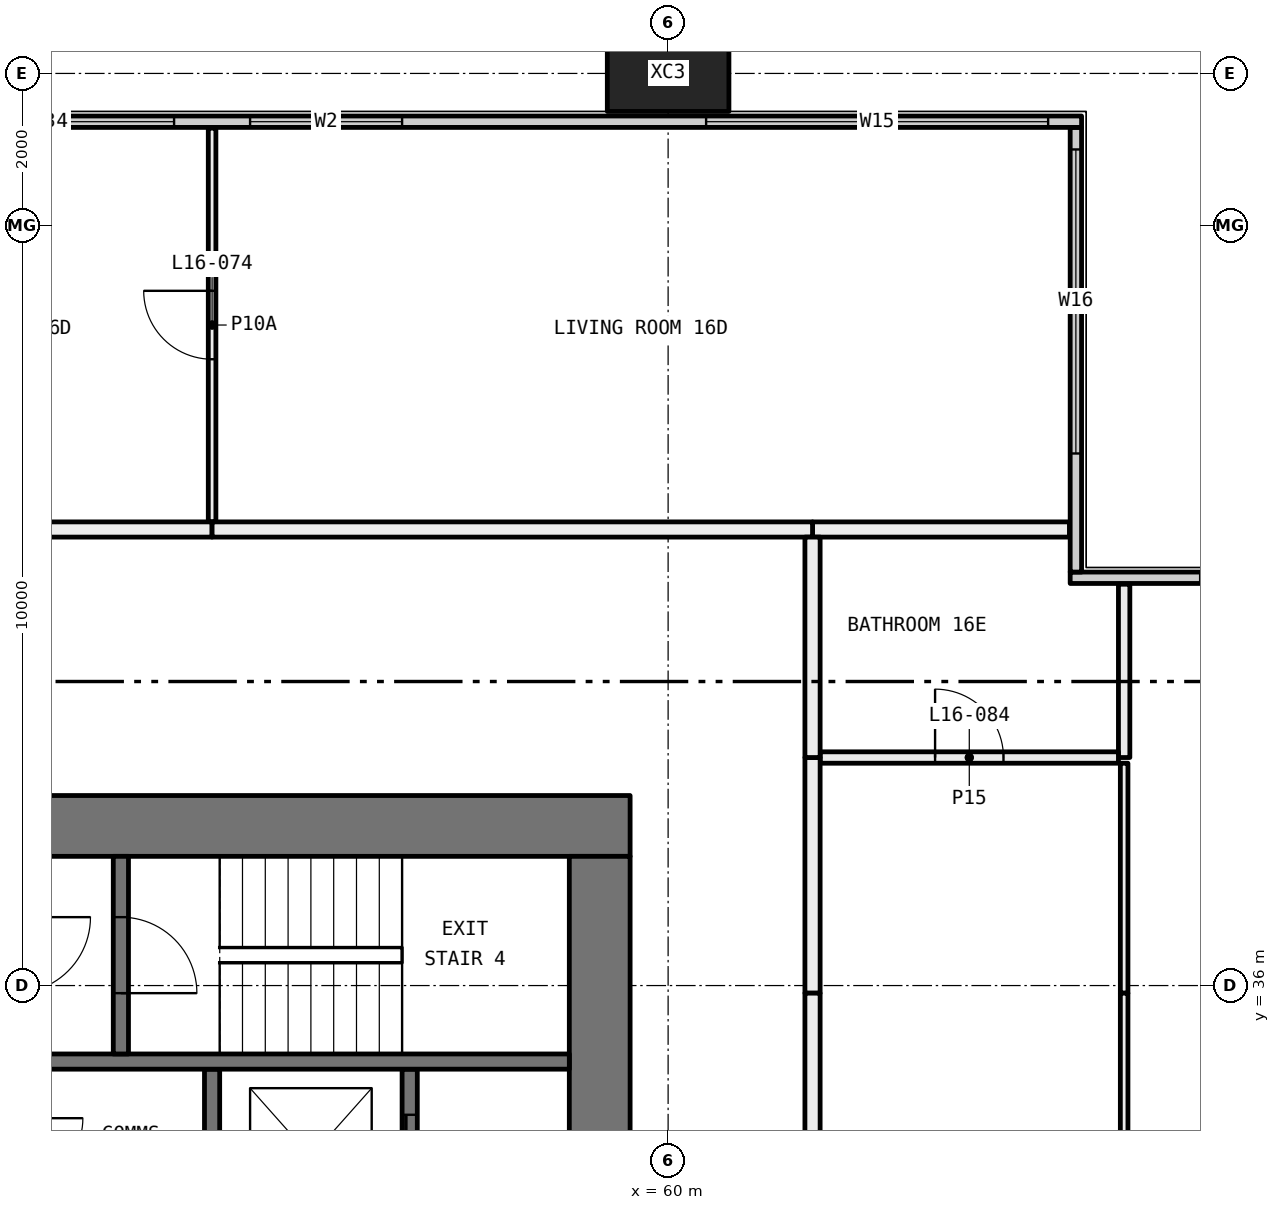
"""IFC4 building model, lengths in metres.
Left out: names, types, materials, properties, quantities, classifications, styles, units other than length and angle.
Written with IfcOpenShell. Run it as: python <this file> out.ifc"""

import sys

from ifc_helpers import new_model, si_unit, direction, frame, frame_2d, origin, origin_2d, place, context, subcontext, project, spatial, rectangle, hollow_rectangle, extrude, element, fill, save


model = new_model("IFC4")
c1 = context("Model", 3, precision=1e-05, world=origin(), true_north=direction((0.0, 1.0)))
c2 = subcontext(c1, "Body", "Model", "MODEL_VIEW")
j1 = project(units=[si_unit("LENGTHUNIT", "METRE"), si_unit("PLANEANGLEUNIT", "RADIAN")], contexts=[c1])
p1 = place(None, origin())
s1 = spatial("IfcSite", under=j1, at=p1, CompositionType="ELEMENT")
p2 = place(p1, origin())
s2 = spatial("IfcBuilding", under=s1, at=p2, CompositionType="ELEMENT")
p3 = place(p2, frame((0.0, 0.0, 67.95)))
s3 = spatial("IfcBuildingStorey", under=s2, at=p3, CompositionType="ELEMENT", Elevation=67.95)
p4 = place(p3, frame((60.0, 48.0, -0.4), z_axis=(0.0, 0.0, 1.0), x_axis=(1.0, 0.0, 0.0)))
e1 = element("IfcColumn", 1, at=p4, inside=s3, PredefinedType="COLUMN", context=c2, shape_type="SweptSolid", body=[
    extrude(hollow_rectangle(XDim=1.6, YDim=1.0, WallThickness=0.065, at=origin_2d()), origin(), (0.0, 0.0, 1.0), 3.45),
])
p5 = place(p3, frame((65.29, 41.365, 0.0), z_axis=(0.0, 0.0, 1.0), x_axis=(1.0, 0.0, 0.0)))
e2 = element("IfcWall", 2, at=p5, inside=s3, PredefinedType="ELEMENTEDWALL", context=c2, shape_type="SweptSolid", body=[
    extrude(rectangle(XDim=6.15, YDim=0.15, at=frame_2d((3.075, 0.0))), origin(), (0.0, 0.0, 1.0), 3.05),
])
p6 = place(p5, frame((1.71, 0.0, 0.45)))
e3 = element("IfcOpeningElement", 3, at=p6, cuts=e2, PredefinedType="OPENING", context=c2, shape_type="SweptSolid", body=[
    extrude(rectangle(XDim=4.0, YDim=2.55, at=frame_2d((2.0, 1.275))), frame((0.0, 0.085, 0.0), z_axis=(0.0, -1.0, 0.0), x_axis=(1.0, 0.0, 0.0)), (0.0, 0.0, 1.0), 0.17),
])
p7 = place(p3, frame((65.365, 41.44, 0.0), z_axis=(0.0, 0.0, 1.0), x_axis=(0.0, 1.0, 0.0)))
e4 = element("IfcWall", 4, at=p7, inside=s3, PredefinedType="ELEMENTEDWALL", context=c2, shape_type="SweptSolid", body=[
    extrude(rectangle(XDim=5.85, YDim=0.15, at=frame_2d((2.925, 0.0))), origin(), (0.0, 0.0, 1.0), 3.05),
])
p8 = place(p7, frame((1.56, 0.0, 0.45)))
e5 = element("IfcOpeningElement", 5, at=p8, cuts=e4, PredefinedType="OPENING", context=c2, shape_type="SweptSolid", body=[
    extrude(rectangle(XDim=4.0, YDim=2.55, at=frame_2d((2.0, 1.275))), frame((0.0, 0.085, 0.0), z_axis=(0.0, -1.0, 0.0), x_axis=(1.0, 0.0, 0.0)), (0.0, 0.0, 1.0), 0.17),
])
p9 = place(p3, frame((6.56, 47.365, 0.0), z_axis=(0.0, 0.0, 1.0), x_axis=(1.0, 0.0, 0.0)))
e6 = element("IfcWall", 6, at=p9, inside=s3, PredefinedType="ELEMENTEDWALL", context=c2, shape_type="SweptSolid", body=[
    extrude(rectangle(XDim=58.88, YDim=0.15, at=frame_2d((29.44, 0.0))), origin(), (0.0, 0.0, 1.0), 3.05),
])
p10 = place(p9, frame((0.44, 0.0, 0.45)))
e7 = element("IfcOpeningElement", 7, at=p10, cuts=e6, PredefinedType="OPENING", context=c2, shape_type="SweptSolid", body=[
    extrude(rectangle(XDim=4.5, YDim=2.55, at=frame_2d((2.25, 1.275))), frame((0.0, 0.085, 0.0), z_axis=(0.0, -1.0, 0.0), x_axis=(1.0, 0.0, 0.0)), (0.0, 0.0, 1.0), 0.17),
])
p11 = place(p9, frame((7.69, 0.0, 0.45)))
e8 = element("IfcOpeningElement", 8, at=p11, cuts=e6, PredefinedType="OPENING", context=c2, shape_type="SweptSolid", body=[
    extrude(rectangle(XDim=3.25, YDim=2.55, at=frame_2d((1.625, 1.275))), frame((0.0, 0.085, 0.0), z_axis=(0.0, -1.0, 0.0), x_axis=(1.0, 0.0, 0.0)), (0.0, 0.0, 1.0), 0.17),
])
p12 = place(p9, frame((11.94, 0.0, 0.45)))
e9 = element("IfcOpeningElement", 9, at=p12, cuts=e6, PredefinedType="OPENING", context=c2, shape_type="SweptSolid", body=[
    extrude(rectangle(XDim=3.25, YDim=2.55, at=frame_2d((1.625, 1.275))), frame((0.0, 0.085, 0.0), z_axis=(0.0, -1.0, 0.0), x_axis=(1.0, 0.0, 0.0)), (0.0, 0.0, 1.0), 0.17),
])
p13 = place(p9, frame((19.69, 0.0, 0.45)))
e10 = element("IfcOpeningElement", 10, at=p13, cuts=e6, PredefinedType="OPENING", context=c2, shape_type="SweptSolid", body=[
    extrude(rectangle(XDim=3.25, YDim=2.55, at=frame_2d((1.625, 1.275))), frame((0.0, 0.085, 0.0), z_axis=(0.0, -1.0, 0.0), x_axis=(1.0, 0.0, 0.0)), (0.0, 0.0, 1.0), 0.17),
])
p14 = place(p9, frame((23.94, 0.0, 0.45)))
e11 = element("IfcOpeningElement", 11, at=p14, cuts=e6, PredefinedType="OPENING", context=c2, shape_type="SweptSolid", body=[
    extrude(rectangle(XDim=2.0, YDim=2.55, at=frame_2d((1.0, 1.275))), frame((0.0, 0.085, 0.0), z_axis=(0.0, -1.0, 0.0), x_axis=(1.0, 0.0, 0.0)), (0.0, 0.0, 1.0), 0.17),
])
p15 = place(p9, frame((31.69, 0.0, 0.45)))
e12 = element("IfcOpeningElement", 12, at=p15, cuts=e6, PredefinedType="OPENING", context=c2, shape_type="SweptSolid", body=[
    extrude(rectangle(XDim=3.25, YDim=2.55, at=frame_2d((1.625, 1.275))), frame((0.0, 0.085, 0.0), z_axis=(0.0, -1.0, 0.0), x_axis=(1.0, 0.0, 0.0)), (0.0, 0.0, 1.0), 0.17),
])
p16 = place(p9, frame((35.94, 0.0, 0.45)))
e13 = element("IfcOpeningElement", 13, at=p16, cuts=e6, PredefinedType="OPENING", context=c2, shape_type="SweptSolid", body=[
    extrude(rectangle(XDim=3.25, YDim=2.55, at=frame_2d((1.625, 1.275))), frame((0.0, 0.085, 0.0), z_axis=(0.0, -1.0, 0.0), x_axis=(1.0, 0.0, 0.0)), (0.0, 0.0, 1.0), 0.17),
])
p17 = place(p9, frame((43.69, 0.0, 0.45)))
e14 = element("IfcOpeningElement", 14, at=p17, cuts=e6, PredefinedType="OPENING", context=c2, shape_type="SweptSolid", body=[
    extrude(rectangle(XDim=3.25, YDim=2.55, at=frame_2d((1.625, 1.275))), frame((0.0, 0.085, 0.0), z_axis=(0.0, -1.0, 0.0), x_axis=(1.0, 0.0, 0.0)), (0.0, 0.0, 1.0), 0.17),
])
p18 = place(p9, frame((47.94, 0.0, 0.45)))
e15 = element("IfcOpeningElement", 15, at=p18, cuts=e6, PredefinedType="OPENING", context=c2, shape_type="SweptSolid", body=[
    extrude(rectangle(XDim=2.0, YDim=2.55, at=frame_2d((1.0, 1.275))), frame((0.0, 0.085, 0.0), z_axis=(0.0, -1.0, 0.0), x_axis=(1.0, 0.0, 0.0)), (0.0, 0.0, 1.0), 0.17),
])
p19 = place(p9, frame((53.94, 0.0, 0.45)))
e16 = element("IfcOpeningElement", 16, at=p19, cuts=e6, PredefinedType="OPENING", context=c2, shape_type="SweptSolid", body=[
    extrude(rectangle(XDim=4.5, YDim=2.55, at=frame_2d((2.25, 1.275))), frame((0.0, 0.085, 0.0), z_axis=(0.0, -1.0, 0.0), x_axis=(1.0, 0.0, 0.0)), (0.0, 0.0, 1.0), 0.17),
])
p20 = place(p3, frame((54.0, 42.1, 0.0), z_axis=(0.0, 0.0, 1.0), x_axis=(0.0, 1.0, 0.0)))
e17 = element("IfcWall", 17, at=p20, inside=s3, PredefinedType="PARTITIONING", context=c2, shape_type="SweptSolid", body=[
    extrude(rectangle(XDim=5.18, YDim=0.1, at=frame_2d((2.59, 0.0))), origin(), (0.0, 0.0, 1.0), 3.05),
])
p21 = place(p20, frame((2.14, 0.0, 0.0)))
e18 = element("IfcOpeningElement", 18, at=p21, cuts=e17, PredefinedType="OPENING", context=c2, shape_type="SweptSolid", body=[
    extrude(rectangle(XDim=0.9, YDim=2.1, at=frame_2d((0.45, 1.05))), frame((0.0, 0.06, 0.0), z_axis=(0.0, -1.0, 0.0), x_axis=(1.0, 0.0, 0.0)), (0.0, 0.0, 1.0), 0.12),
])
p22 = place(p3, frame((48.0, 42.0, 0.0), z_axis=(0.0, 0.0, 1.0), x_axis=(1.0, 0.0, 0.0)))
e19 = element("IfcWall", 19, at=p22, inside=s3, PredefinedType="PARTITIONING", context=c2, shape_type="SweptSolid", body=[
    extrude(rectangle(XDim=6.0, YDim=0.2, at=frame_2d((3.0, 0.0))), origin(), (0.0, 0.0, 1.0), 3.05),
])
p23 = place(p3, frame((61.9, 42.0, 0.0), z_axis=(0.0, 0.0, 1.0), x_axis=(1.0, 0.0, 0.0)))
e20 = element("IfcWall", 20, at=p23, inside=s3, PredefinedType="PARTITIONING", context=c2, shape_type="SweptSolid", body=[
    extrude(rectangle(XDim=3.38, YDim=0.2, at=frame_2d((1.69, 0.0))), origin(), (0.0, 0.0, 1.0), 3.05),
])
p24 = place(p3, frame((54.0, 42.0, 0.0), z_axis=(0.0, 0.0, 1.0), x_axis=(1.0, 0.0, 0.0)))
e21 = element("IfcWall", 21, at=p24, inside=s3, PredefinedType="PARTITIONING", context=c2, shape_type="SweptSolid", body=[
    extrude(rectangle(XDim=7.9, YDim=0.2, at=frame_2d((3.95, 0.0))), origin(), (0.0, 0.0, 1.0), 3.05),
])
p25 = place(p3, frame((66.0, 38.925, 0.0), z_axis=(0.0, 0.0, 1.0), x_axis=(0.0, -1.0, 0.0)))
e22 = element("IfcWall", 22, at=p25, inside=s3, PredefinedType="PARTITIONING", context=c2, shape_type="SweptSolid", body=[
    extrude(rectangle(XDim=3.025, YDim=0.1, at=frame_2d((1.513, 0.0))), origin(), (0.0, 0.0, 1.0), 2.45),
])
p26 = place(p3, frame((66.0, 35.9, 0.0), z_axis=(0.0, 0.0, 1.0), x_axis=(0.0, -1.0, 0.0)))
e23 = element("IfcWall", 23, at=p26, inside=s3, PredefinedType="PARTITIONING", context=c2, shape_type="SweptSolid", body=[
    extrude(rectangle(XDim=5.85, YDim=0.1, at=frame_2d((2.925, 0.0))), origin(), (0.0, 0.0, 1.0), 3.05),
])
p27 = place(p26, frame((2.475, 0.0, 0.0)))
e24 = element("IfcOpeningElement", 24, at=p27, cuts=e23, PredefinedType="OPENING", context=c2, shape_type="SweptSolid", body=[
    extrude(rectangle(XDim=0.9, YDim=2.1, at=frame_2d((0.45, 1.05))), frame((0.0, 0.06, 0.0), z_axis=(0.0, -1.0, 0.0), x_axis=(1.0, 0.0, 0.0)), (0.0, 0.0, 1.0), 0.12),
])
p28 = place(p3, frame((66.0, 41.28, 0.0), z_axis=(0.0, 0.0, 1.0), x_axis=(0.0, -1.0, 0.0)))
e25 = element("IfcWall", 25, at=p28, inside=s3, PredefinedType="PARTITIONING", context=c2, shape_type="SweptSolid", body=[
    extrude(rectangle(XDim=2.28, YDim=0.15, at=frame_2d((1.14, 0.0))), origin(), (0.0, 0.0, 1.0), 3.05),
])
p29 = place(p3, frame((65.925, 39.0, 0.0), z_axis=(0.0, 0.0, 1.0), x_axis=(-1.0, 0.0, 0.0)))
e26 = element("IfcWall", 26, at=p29, inside=s3, PredefinedType="PARTITIONING", context=c2, shape_type="SweptSolid", body=[
    extrude(rectangle(XDim=3.925, YDim=0.15, at=frame_2d((1.962, 0.0))), origin(), (0.0, 0.0, 1.0), 3.05),
])
p30 = place(p29, frame((1.512, 0.0, 0.0)))
e27 = element("IfcOpeningElement", 27, at=p30, cuts=e26, PredefinedType="OPENING", context=c2, shape_type="SweptSolid", body=[
    extrude(rectangle(XDim=0.9, YDim=2.1, at=frame_2d((0.45, 1.05))), frame((0.0, 0.085, 0.0), z_axis=(0.0, -1.0, 0.0), x_axis=(1.0, 0.0, 0.0)), (0.0, 0.0, 1.0), 0.17),
])
p31 = place(p3, frame((61.9, 39.0, 0.0), z_axis=(0.0, 0.0, 1.0), x_axis=(0.0, -1.0, 0.0)))
e28 = element("IfcWall", 28, at=p31, inside=s3, PredefinedType="PARTITIONING", context=c2, shape_type="SweptSolid", body=[
    extrude(rectangle(XDim=3.1, YDim=0.2, at=frame_2d((1.55, 0.0))), origin(), (0.0, 0.0, 1.0), 2.45),
])
p32 = place(p3, frame((61.9, 35.9, 0.0), z_axis=(0.0, 0.0, 1.0), x_axis=(0.0, -1.0, 0.0)))
e29 = element("IfcWall", 29, at=p32, inside=s3, PredefinedType="PARTITIONING", context=c2, shape_type="SweptSolid", body=[
    extrude(rectangle(XDim=10.4, YDim=0.2, at=frame_2d((5.2, 0.0))), origin(), (0.0, 0.0, 1.0), 3.05),
])
p33 = place(p3, frame((61.9, 41.9, 0.0), z_axis=(0.0, 0.0, 1.0), x_axis=(0.0, -1.0, 0.0)))
e30 = element("IfcWall", 30, at=p33, inside=s3, PredefinedType="PARTITIONING", context=c2, shape_type="SweptSolid", body=[
    extrude(rectangle(XDim=2.9, YDim=0.2, at=frame_2d((1.45, 0.0))), origin(), (0.0, 0.0, 1.0), 3.05),
])
p34 = place(p3, frame((59.5, 38.1, 0.0), z_axis=(0.0, 0.0, 1.0), x_axis=(-1.0, 0.0, 0.0)))
e31 = element("IfcWall", 31, at=p34, inside=s3, PredefinedType="SHEAR", context=c2, shape_type="SweptSolid", body=[
    extrude(rectangle(XDim=11.0, YDim=0.8, at=frame_2d((5.5, 0.0))), origin(), (0.0, 0.0, 1.0), 3.05),
])
p35 = place(p34, frame((8.4, 0.0, 0.0)))
e32 = element("IfcOpeningElement", 32, at=p35, cuts=e31, PredefinedType="OPENING", context=c2, shape_type="SweptSolid", body=[
    extrude(rectangle(XDim=1.6, YDim=2.1, at=frame_2d((0.8, 1.05))), frame((0.0, 0.41, 0.0), z_axis=(0.0, -1.0, 0.0), x_axis=(1.0, 0.0, 0.0)), (0.0, 0.0, 1.0), 0.82),
])
p36 = place(p3, frame((59.1, 22.3, 0.0), z_axis=(0.0, 0.0, 1.0), x_axis=(0.0, 1.0, 0.0)))
e33 = element("IfcWall", 33, at=p36, inside=s3, PredefinedType="SHEAR", context=c2, shape_type="SweptSolid", body=[
    extrude(rectangle(XDim=15.4, YDim=0.8, at=frame_2d((7.7, 0.0))), origin(), (0.0, 0.0, 1.0), 3.05),
])
p37 = place(p36, frame((8.15, 0.0, 0.0)))
e34 = element("IfcOpeningElement", 34, at=p37, cuts=e33, PredefinedType="OPENING", context=c2, shape_type="SweptSolid", body=[
    extrude(rectangle(XDim=1.6, YDim=2.1, at=frame_2d((0.8, 1.05))), frame((0.0, 0.41, 0.0), z_axis=(0.0, -1.0, 0.0), x_axis=(1.0, 0.0, 0.0)), (0.0, 0.0, 1.0), 0.82),
])
p38 = place(p36, frame((2.05, 0.0, 0.0)))
e35 = element("IfcOpeningElement", 35, at=p38, cuts=e33, PredefinedType="OPENING", context=c2, shape_type="SweptSolid", body=[
    extrude(rectangle(XDim=1.0, YDim=2.1, at=frame_2d((0.5, 1.05))), frame((0.0, 0.41, 0.0), z_axis=(0.0, -1.0, 0.0), x_axis=(1.0, 0.0, 0.0)), (0.0, 0.0, 1.0), 0.82),
])
p39 = place(p3, frame((56.6, 22.3, 0.0), z_axis=(0.0, 0.0, 1.0), x_axis=(0.0, 1.0, 0.0)))
e36 = element("IfcWall", 36, at=p39, inside=s3, PredefinedType="SOLIDWALL", context=c2, shape_type="SweptSolid", body=[
    extrude(rectangle(XDim=12.6, YDim=0.2, at=frame_2d((6.3, 0.0))), origin(), (0.0, 0.0, 1.0), 3.05),
])
p40 = place(p39, frame((3.4, 0.0, 0.0)))
e37 = element("IfcOpeningElement", 37, at=p40, cuts=e36, PredefinedType="OPENING", context=c2, shape_type="SweptSolid", body=[
    extrude(rectangle(XDim=1.1, YDim=2.1, at=frame_2d((0.55, 1.05))), frame((0.0, 0.11, 0.0), z_axis=(0.0, -1.0, 0.0), x_axis=(1.0, 0.0, 0.0)), (0.0, 0.0, 1.0), 0.22),
])
p41 = place(p39, frame((5.9, 0.0, 0.0)))
e38 = element("IfcOpeningElement", 38, at=p41, cuts=e36, PredefinedType="OPENING", context=c2, shape_type="SweptSolid", body=[
    extrude(rectangle(XDim=1.1, YDim=2.1, at=frame_2d((0.55, 1.05))), frame((0.0, 0.11, 0.0), z_axis=(0.0, -1.0, 0.0), x_axis=(1.0, 0.0, 0.0)), (0.0, 0.0, 1.0), 0.22),
])
p42 = place(p39, frame((8.4, 0.0, 0.0)))
e39 = element("IfcOpeningElement", 39, at=p42, cuts=e36, PredefinedType="OPENING", context=c2, shape_type="SweptSolid", body=[
    extrude(rectangle(XDim=1.1, YDim=2.1, at=frame_2d((0.55, 1.05))), frame((0.0, 0.11, 0.0), z_axis=(0.0, -1.0, 0.0), x_axis=(1.0, 0.0, 0.0)), (0.0, 0.0, 1.0), 0.22),
])
p43 = place(p39, frame((10.9, 0.0, 0.0)))
e40 = element("IfcOpeningElement", 40, at=p43, cuts=e36, PredefinedType="OPENING", context=c2, shape_type="SweptSolid", body=[
    extrude(rectangle(XDim=1.1, YDim=2.1, at=frame_2d((0.55, 1.05))), frame((0.0, 0.11, 0.0), z_axis=(0.0, -1.0, 0.0), x_axis=(1.0, 0.0, 0.0)), (0.0, 0.0, 1.0), 0.22),
])
p44 = place(p39, frame((0.15, 0.0, 0.0)))
e41 = element("IfcOpeningElement", 41, at=p44, cuts=e36, PredefinedType="OPENING", context=c2, shape_type="SweptSolid", body=[
    extrude(rectangle(XDim=1.0, YDim=2.1, at=frame_2d((0.5, 1.05))), frame((0.0, 0.11, 0.0), z_axis=(0.0, -1.0, 0.0), x_axis=(1.0, 0.0, 0.0)), (0.0, 0.0, 1.0), 0.22),
])
p45 = place(p3, frame((54.0, 25.1, 0.0), z_axis=(0.0, 0.0, 1.0), x_axis=(0.0, 1.0, 0.0)))
e42 = element("IfcWall", 42, at=p45, inside=s3, PredefinedType="SOLIDWALL", context=c2, shape_type="SweptSolid", body=[
    extrude(rectangle(XDim=9.8, YDim=0.2, at=frame_2d((4.9, 0.0))), origin(), (0.0, 0.0, 1.0), 3.05),
])
p46 = place(p3, frame((58.7, 35.0, 0.0), z_axis=(0.0, 0.0, 1.0), x_axis=(-1.0, 0.0, 0.0)))
e43 = element("IfcWall", 43, at=p46, inside=s3, PredefinedType="SOLIDWALL", context=c2, shape_type="SweptSolid", body=[
    extrude(rectangle(XDim=7.2, YDim=0.2, at=frame_2d((3.6, 0.0))), origin(), (0.0, 0.0, 1.0), 3.05),
])
p47 = place(p3, frame((52.8, 35.1, 0.0), z_axis=(0.0, 0.0, 1.0), x_axis=(0.0, 1.0, 0.0)))
e44 = element("IfcWall", 44, at=p47, inside=s3, PredefinedType="SOLIDWALL", context=c2, shape_type="SweptSolid", body=[
    extrude(rectangle(XDim=2.6, YDim=0.2, at=frame_2d((1.3, 0.0))), origin(), (0.0, 0.0, 1.0), 3.05),
])
p48 = place(p47, frame((0.8, 0.0, 0.0)))
e45 = element("IfcOpeningElement", 45, at=p48, cuts=e44, PredefinedType="OPENING", context=c2, shape_type="SweptSolid", body=[
    extrude(rectangle(XDim=1.0, YDim=2.1, at=frame_2d((0.5, 1.05))), frame((0.0, 0.11, 0.0), z_axis=(0.0, -1.0, 0.0), x_axis=(1.0, 0.0, 0.0)), (0.0, 0.0, 1.0), 0.22),
])
p49 = place(p8, origin())
e46 = element("IfcWindow", 46, at=p49, inside=s3, PartitioningType="SINGLE_PANEL", PredefinedType="WINDOW", context=c2, shape_type="SweptSolid", body=[
    extrude(rectangle(XDim=4.0, YDim=2.55, at=frame_2d((2.0, 1.275))), frame((0.0, 0.03, 0.0), z_axis=(0.0, -1.0, 0.0), x_axis=(1.0, 0.0, 0.0)), (0.0, 0.0, 1.0), 0.06),
])
fill(e5, e46)
p50 = place(p17, origin())
e47 = element("IfcWindow", 47, at=p50, inside=s3, PartitioningType="SINGLE_PANEL", PredefinedType="WINDOW", context=c2, shape_type="SweptSolid", body=[
    extrude(rectangle(XDim=3.25, YDim=2.55, at=frame_2d((1.625, 1.275))), frame((0.0, 0.03, 0.0), z_axis=(0.0, -1.0, 0.0), x_axis=(1.0, 0.0, 0.0)), (0.0, 0.0, 1.0), 0.06),
])
fill(e14, e47)
p51 = place(p18, origin())
e48 = element("IfcWindow", 48, at=p51, inside=s3, PartitioningType="SINGLE_PANEL", PredefinedType="WINDOW", context=c2, shape_type="SweptSolid", body=[
    extrude(rectangle(XDim=2.0, YDim=2.55, at=frame_2d((1.0, 1.275))), frame((0.0, 0.03, 0.0), z_axis=(0.0, -1.0, 0.0), x_axis=(1.0, 0.0, 0.0)), (0.0, 0.0, 1.0), 0.06),
])
fill(e15, e48)
p52 = place(p19, origin())
e49 = element("IfcWindow", 49, at=p52, inside=s3, PartitioningType="SINGLE_PANEL", PredefinedType="WINDOW", context=c2, shape_type="SweptSolid", body=[
    extrude(rectangle(XDim=4.5, YDim=2.55, at=frame_2d((2.25, 1.275))), frame((0.0, 0.03, 0.0), z_axis=(0.0, -1.0, 0.0), x_axis=(1.0, 0.0, 0.0)), (0.0, 0.0, 1.0), 0.06),
])
fill(e16, e49)
p53 = place(p21, origin())
e50 = element("IfcDoor", 50, at=p53, inside=s3, OperationType="SINGLE_SWING_LEFT", PredefinedType="DOOR", context=c2, shape_type="SweptSolid", body=[
    extrude(rectangle(XDim=0.9, YDim=2.1, at=frame_2d((0.45, 1.05))), frame((0.0, 0.025, 0.0), z_axis=(0.0, -1.0, 0.0), x_axis=(1.0, 0.0, 0.0)), (0.0, 0.0, 1.0), 0.05),
])
fill(e18, e50)
p54 = place(p30, frame((0.9, 0.0, 0.0), x_axis=(-1.0, 0.0, 0.0)))
e51 = element("IfcDoor", 51, at=p54, inside=s3, OperationType="SINGLE_SWING_RIGHT", PredefinedType="DOOR", context=c2, shape_type="SweptSolid", body=[
    extrude(rectangle(XDim=0.9, YDim=2.1, at=frame_2d((0.45, 1.05))), frame((0.0, 0.025, 0.0), z_axis=(0.0, -1.0, 0.0), x_axis=(1.0, 0.0, 0.0)), (0.0, 0.0, 1.0), 0.05),
])
fill(e27, e51)
p55 = place(p43, origin())
e52 = element("IfcDoor", 52, at=p55, inside=s3, OperationType="SLIDING_TO_LEFT", PredefinedType="DOOR", context=c2, shape_type="SweptSolid", body=[
    extrude(rectangle(XDim=1.1, YDim=2.1, at=frame_2d((0.55, 1.05))), frame((0.0, 0.025, 0.0), z_axis=(0.0, -1.0, 0.0), x_axis=(1.0, 0.0, 0.0)), (0.0, 0.0, 1.0), 0.05),
])
fill(e40, e52)
p56 = place(p48, frame((1.0, 0.0, 0.0), x_axis=(-1.0, 0.0, 0.0)))
e53 = element("IfcDoor", 53, at=p56, inside=s3, OperationType="SINGLE_SWING_LEFT", PredefinedType="DOOR", context=c2, shape_type="SweptSolid", body=[
    extrude(rectangle(XDim=1.0, YDim=2.1, at=frame_2d((0.5, 1.05))), frame((0.0, 0.025, 0.0), z_axis=(0.0, -1.0, 0.0), x_axis=(1.0, 0.0, 0.0)), (0.0, 0.0, 1.0), 0.05),
])
fill(e45, e53)
save(model, sys.argv[1])
